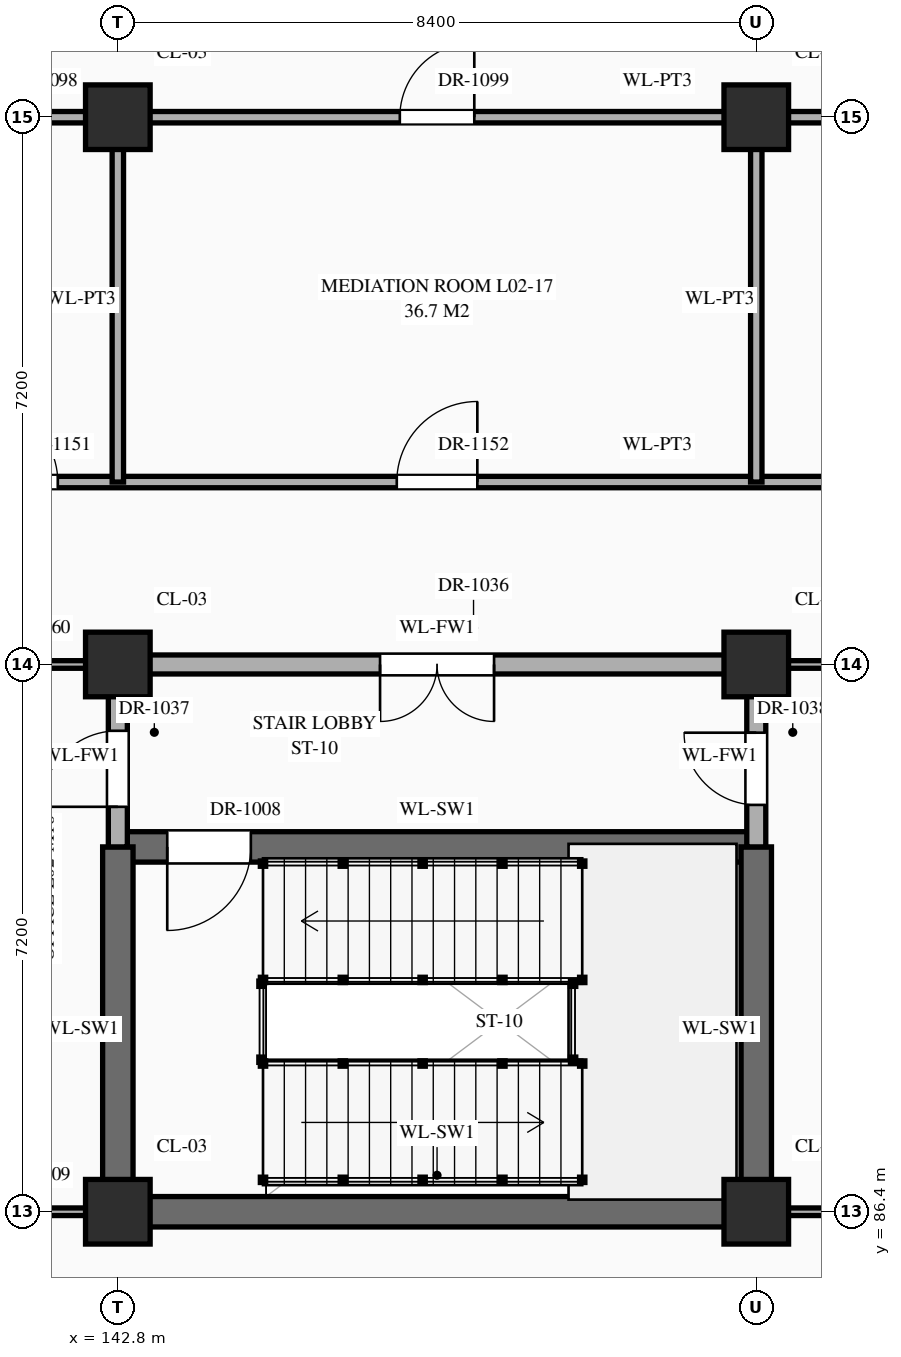
"""IFC4 building model, lengths in metres.
Left out: names, types, materials, properties, quantities, classifications, styles, units other than length and angle.
Written with IfcOpenShell. Run it as: python <this file> out.ifc"""

import sys

from ifc_helpers import new_model, si_unit, direction, frame, frame_2d, origin, origin_2d, place, context, subcontext, project, spatial, rectangle, extrude, element, fill, save


model = new_model("IFC4")
c1 = context("Model", 3, precision=1e-05, world=origin(), true_north=direction((0.0, 1.0)))
c2 = subcontext(c1, "Body", "Model", "MODEL_VIEW")
j1 = project(units=[si_unit("LENGTHUNIT", "METRE"), si_unit("PLANEANGLEUNIT", "RADIAN")], contexts=[c1])
p1 = place(None, origin())
s1 = spatial("IfcSite", under=j1, at=p1, CompositionType="ELEMENT")
p2 = place(p1, origin())
s2 = spatial("IfcBuilding", under=s1, at=p2, CompositionType="ELEMENT")
p3 = place(p2, frame((0.0, 0.0, 5.4)))
s3 = spatial("IfcBuildingStorey", under=s2, at=p3, CompositionType="ELEMENT", Elevation=5.4)
for number, where, z_axis, x_axis in (
    (1, (142.8, 86.4, 0.0), (0.0, 0.0, 1.0), (1.0, 0.0, 0.0)),
    (2, (142.8, 93.6, 0.0), (0.0, 0.0, 1.0), (1.0, 0.0, 0.0)),
    (3, (142.8, 100.8, 0.0), (0.0, 0.0, 1.0), (1.0, 0.0, 0.0)),
    (4, (151.2, 86.4, 0.0), (0.0, 0.0, 1.0), (1.0, 0.0, 0.0)),
    (5, (151.2, 93.6, 0.0), (0.0, 0.0, 1.0), (1.0, 0.0, 0.0)),
    (6, (151.2, 100.8, 0.0), (0.0, 0.0, 1.0), (1.0, 0.0, 0.0)),
):
    element("IfcColumn", number, at=place(p3, frame(where, z_axis=z_axis, x_axis=x_axis)), inside=s3, PredefinedType="COLUMN", context=c2, shape_type="SweptSolid", body=[
        extrude(rectangle(XDim=0.85, YDim=0.85, at=origin_2d()), origin(), (0.0, 0.0, 1.0), 5.4),
    ])
p4 = place(p3, frame((126.0, 86.4, 0.0), z_axis=(0.0, 0.0, 1.0), x_axis=(1.0, 0.0, 0.0)))
e7 = element("IfcWall", 7, at=p4, inside=s3, PredefinedType="STANDARD", context=c2, shape_type="SweptSolid", body=[
    extrude(rectangle(XDim=16.8, YDim=0.1, at=frame_2d((8.4, 0.0))), origin(), (0.0, 0.0, 1.0), 4.27),
])
p5 = place(p4, frame((3.63, 0.0, 0.0)))
e8 = element("IfcOpeningElement", 8, at=p5, cuts=e7, PredefinedType="OPENING", context=c2, shape_type="SweptSolid", body=[
    extrude(rectangle(XDim=1.14, YDim=2.4, at=frame_2d((0.57, 1.2))), frame((0.0, 0.062, 0.0), z_axis=(0.0, -1.0, 0.0), x_axis=(1.0, 0.0, 0.0)), (0.0, 0.0, 1.0), 0.124),
])
p6 = place(p4, frame((9.542, 0.0, 0.0)))
e9 = element("IfcOpeningElement", 9, at=p6, cuts=e7, PredefinedType="OPENING", context=c2, shape_type="SweptSolid", body=[
    extrude(rectangle(XDim=0.86, YDim=2.1, at=frame_2d((0.43, 1.05))), frame((0.0, 0.062, 0.0), z_axis=(0.0, -1.0, 0.0), x_axis=(1.0, 0.0, 0.0)), (0.0, 0.0, 1.0), 0.124),
])
p7 = place(p4, frame((11.875, 0.0, 0.0)))
e10 = element("IfcOpeningElement", 10, at=p7, cuts=e7, PredefinedType="OPENING", context=c2, shape_type="SweptSolid", body=[
    extrude(rectangle(XDim=1.45, YDim=2.3, at=frame_2d((0.725, 1.15))), frame((0.0, 0.062, 0.0), z_axis=(0.0, -1.0, 0.0), x_axis=(1.0, 0.0, 0.0)), (0.0, 0.0, 1.0), 0.124),
])
p8 = place(p4, frame((14.728, 0.0, 0.0)))
e11 = element("IfcOpeningElement", 11, at=p8, cuts=e7, PredefinedType="OPENING", context=c2, shape_type="SweptSolid", body=[
    extrude(rectangle(XDim=1.0, YDim=2.25, at=frame_2d((0.5, 1.125))), frame((0.0, 0.062, 0.0), z_axis=(0.0, -1.0, 0.0), x_axis=(1.0, 0.0, 0.0)), (0.0, 0.0, 1.0), 0.124),
])
p9 = place(p3, frame((142.8, 86.4, 0.0), z_axis=(0.0, 0.0, 1.0), x_axis=(1.0, 0.0, 0.0)))
e12 = element("IfcWall", 12, at=p9, inside=s3, PredefinedType="SHEAR", context=c2, shape_type="SweptSolid", body=[
    extrude(rectangle(XDim=8.4, YDim=0.4, at=frame_2d((4.2, 0.0))), origin(), (0.0, 0.0, 1.0), 5.12),
])
p10 = place(p3, frame((151.2, 86.4, 0.0), z_axis=(0.0, 0.0, 1.0), x_axis=(1.0, 0.0, 0.0)))
e13 = element("IfcWall", 13, at=p10, inside=s3, PredefinedType="STANDARD", context=c2, shape_type="SweptSolid", body=[
    extrude(rectangle(XDim=16.76, YDim=0.1, at=frame_2d((8.38, 0.0))), origin(), (0.0, 0.0, 1.0), 4.27),
])
p11 = place(p10, frame((3.68, 0.0, 0.0)))
e14 = element("IfcOpeningElement", 14, at=p11, cuts=e13, PredefinedType="OPENING", context=c2, shape_type="SweptSolid", body=[
    extrude(rectangle(XDim=1.04, YDim=2.2, at=frame_2d((0.52, 1.1))), frame((0.0, 0.062, 0.0), z_axis=(0.0, -1.0, 0.0), x_axis=(1.0, 0.0, 0.0)), (0.0, 0.0, 1.0), 0.124),
])
p12 = place(p10, frame((9.413, 0.0, 0.0)))
e15 = element("IfcOpeningElement", 15, at=p12, cuts=e13, PredefinedType="OPENING", context=c2, shape_type="SweptSolid", body=[
    extrude(rectangle(XDim=1.12, YDim=2.25, at=frame_2d((0.56, 1.125))), frame((0.0, 0.062, 0.0), z_axis=(0.0, -1.0, 0.0), x_axis=(1.0, 0.0, 0.0)), (0.0, 0.0, 1.0), 0.124),
])
p13 = place(p10, frame((12.0, 0.0, 0.0)))
e16 = element("IfcOpeningElement", 16, at=p13, cuts=e13, PredefinedType="OPENING", context=c2, shape_type="SweptSolid", body=[
    extrude(rectangle(XDim=1.2, YDim=2.35, at=frame_2d((0.6, 1.175))), frame((0.0, 0.062, 0.0), z_axis=(0.0, -1.0, 0.0), x_axis=(1.0, 0.0, 0.0)), (0.0, 0.0, 1.0), 0.124),
])
p14 = place(p10, frame((14.607, 0.0, 0.0)))
e17 = element("IfcOpeningElement", 17, at=p14, cuts=e13, PredefinedType="OPENING", context=c2, shape_type="SweptSolid", body=[
    extrude(rectangle(XDim=1.24, YDim=2.3, at=frame_2d((0.62, 1.15))), frame((0.0, 0.062, 0.0), z_axis=(0.0, -1.0, 0.0), x_axis=(1.0, 0.0, 0.0)), (0.0, 0.0, 1.0), 0.124),
])
p15 = place(p3, frame((142.8, 91.2, 0.0), z_axis=(0.0, 0.0, 1.0), x_axis=(1.0, 0.0, 0.0)))
e18 = element("IfcWall", 18, at=p15, inside=s3, PredefinedType="SHEAR", context=c2, shape_type="SweptSolid", body=[
    extrude(rectangle(XDim=8.4, YDim=0.4, at=frame_2d((4.2, 0.0))), origin(), (0.0, 0.0, 1.0), 5.12),
])
p16 = place(p15, frame((0.65, 0.0, 0.0)))
e19 = element("IfcOpeningElement", 19, at=p16, cuts=e18, PredefinedType="OPENING", context=c2, shape_type="SweptSolid", body=[
    extrude(rectangle(XDim=1.1, YDim=2.2, at=frame_2d((0.55, 1.1))), frame((0.0, 0.212, 0.0), z_axis=(0.0, -1.0, 0.0), x_axis=(1.0, 0.0, 0.0)), (0.0, 0.0, 1.0), 0.424),
])
p17 = place(p3, frame((126.0, 93.6, 0.0), z_axis=(0.0, 0.0, 1.0), x_axis=(1.0, 0.0, 0.0)))
e20 = element("IfcWall", 20, at=p17, inside=s3, PredefinedType="STANDARD", context=c2, shape_type="SweptSolid", body=[
    extrude(rectangle(XDim=16.8, YDim=0.1, at=frame_2d((8.4, 0.0))), origin(), (0.0, 0.0, 1.0), 4.27),
])
p18 = place(p17, frame((3.72, 0.0, 0.0)))
e21 = element("IfcOpeningElement", 21, at=p18, cuts=e20, PredefinedType="OPENING", context=c2, shape_type="SweptSolid", body=[
    extrude(rectangle(XDim=0.96, YDim=2.2, at=frame_2d((0.48, 1.1))), frame((0.0, 0.062, 0.0), z_axis=(0.0, -1.0, 0.0), x_axis=(1.0, 0.0, 0.0)), (0.0, 0.0, 1.0), 0.124),
])
p19 = place(p17, frame((9.472, 0.0, 0.0)))
e22 = element("IfcOpeningElement", 22, at=p19, cuts=e20, PredefinedType="OPENING", context=c2, shape_type="SweptSolid", body=[
    extrude(rectangle(XDim=1.0, YDim=2.25, at=frame_2d((0.5, 1.125))), frame((0.0, 0.062, 0.0), z_axis=(0.0, -1.0, 0.0), x_axis=(1.0, 0.0, 0.0)), (0.0, 0.0, 1.0), 0.124),
])
p20 = place(p17, frame((11.75, 0.0, 0.0)))
e23 = element("IfcOpeningElement", 23, at=p20, cuts=e20, PredefinedType="OPENING", context=c2, shape_type="SweptSolid", body=[
    extrude(rectangle(XDim=1.7, YDim=2.45, at=frame_2d((0.85, 1.225))), frame((0.0, 0.062, 0.0), z_axis=(0.0, -1.0, 0.0), x_axis=(1.0, 0.0, 0.0)), (0.0, 0.0, 1.0), 0.124),
])
p21 = place(p17, frame((14.688, 0.0, 0.0)))
e24 = element("IfcOpeningElement", 24, at=p21, cuts=e20, PredefinedType="OPENING", context=c2, shape_type="SweptSolid", body=[
    extrude(rectangle(XDim=1.08, YDim=2.25, at=frame_2d((0.54, 1.125))), frame((0.0, 0.062, 0.0), z_axis=(0.0, -1.0, 0.0), x_axis=(1.0, 0.0, 0.0)), (0.0, 0.0, 1.0), 0.124),
])
p22 = place(p3, frame((142.8, 93.6, 0.0), z_axis=(0.0, 0.0, 1.0), x_axis=(1.0, 0.0, 0.0)))
e25 = element("IfcWall", 25, at=p22, inside=s3, PredefinedType="STANDARD", context=c2, shape_type="SweptSolid", body=[
    extrude(rectangle(XDim=8.4, YDim=0.25, at=frame_2d((4.2, 0.0))), origin(), (0.0, 0.0, 1.0), 4.27),
])
p23 = place(p22, frame((3.45, 0.0, 0.0)))
e26 = element("IfcOpeningElement", 26, at=p23, cuts=e25, PredefinedType="OPENING", context=c2, shape_type="SweptSolid", body=[
    extrude(rectangle(XDim=1.5, YDim=2.25, at=frame_2d((0.75, 1.125))), frame((0.0, 0.137, 0.0), z_axis=(0.0, -1.0, 0.0), x_axis=(1.0, 0.0, 0.0)), (0.0, 0.0, 1.0), 0.274),
])
p24 = place(p3, frame((151.2, 93.6, 0.0), z_axis=(0.0, 0.0, 1.0), x_axis=(1.0, 0.0, 0.0)))
e27 = element("IfcWall", 27, at=p24, inside=s3, PredefinedType="STANDARD", context=c2, shape_type="SweptSolid", body=[
    extrude(rectangle(XDim=16.76, YDim=0.1, at=frame_2d((8.38, 0.0))), origin(), (0.0, 0.0, 1.0), 4.27),
])
p25 = place(p24, frame((3.64, 0.0, 0.0)))
e28 = element("IfcOpeningElement", 28, at=p25, cuts=e27, PredefinedType="OPENING", context=c2, shape_type="SweptSolid", body=[
    extrude(rectangle(XDim=1.12, YDim=2.25, at=frame_2d((0.56, 1.125))), frame((0.0, 0.062, 0.0), z_axis=(0.0, -1.0, 0.0), x_axis=(1.0, 0.0, 0.0)), (0.0, 0.0, 1.0), 0.124),
])
p26 = place(p24, frame((9.393, 0.0, 0.0)))
e29 = element("IfcOpeningElement", 29, at=p26, cuts=e27, PredefinedType="OPENING", context=c2, shape_type="SweptSolid", body=[
    extrude(rectangle(XDim=1.16, YDim=2.3, at=frame_2d((0.58, 1.15))), frame((0.0, 0.062, 0.0), z_axis=(0.0, -1.0, 0.0), x_axis=(1.0, 0.0, 0.0)), (0.0, 0.0, 1.0), 0.124),
])
p27 = place(p24, frame((12.0, 0.0, 0.0)))
e30 = element("IfcOpeningElement", 30, at=p27, cuts=e27, PredefinedType="OPENING", context=c2, shape_type="SweptSolid", body=[
    extrude(rectangle(XDim=1.2, YDim=2.35, at=frame_2d((0.6, 1.175))), frame((0.0, 0.062, 0.0), z_axis=(0.0, -1.0, 0.0), x_axis=(1.0, 0.0, 0.0)), (0.0, 0.0, 1.0), 0.124),
])
p28 = place(p24, frame((14.607, 0.0, 0.0)))
e31 = element("IfcOpeningElement", 31, at=p28, cuts=e27, PredefinedType="OPENING", context=c2, shape_type="SweptSolid", body=[
    extrude(rectangle(XDim=1.24, YDim=2.3, at=frame_2d((0.62, 1.15))), frame((0.0, 0.062, 0.0), z_axis=(0.0, -1.0, 0.0), x_axis=(1.0, 0.0, 0.0)), (0.0, 0.0, 1.0), 0.124),
])
p29 = place(p3, frame((140.2, 96.0, 0.0), z_axis=(0.0, 0.0, 1.0), x_axis=(1.0, 0.0, 0.0)))
e32 = element("IfcWall", 32, at=p29, inside=s3, PredefinedType="STANDARD", context=c2, shape_type="SweptSolid", body=[
    extrude(rectangle(XDim=19.4, YDim=0.15, at=frame_2d((9.7, 0.0))), origin(), (0.0, 0.0, 1.0), 5.12),
])
p30 = place(p29, frame((0.79, 0.0, 0.0)))
e33 = element("IfcOpeningElement", 33, at=p30, cuts=e32, PredefinedType="OPENING", context=c2, shape_type="SweptSolid", body=[
    extrude(rectangle(XDim=1.02, YDim=2.4, at=frame_2d((0.51, 1.2))), frame((0.0, 0.087, 0.0), z_axis=(0.0, -1.0, 0.0), x_axis=(1.0, 0.0, 0.0)), (0.0, 0.0, 1.0), 0.174),
])
p31 = place(p29, frame((6.27, 0.0, 0.0)))
e34 = element("IfcOpeningElement", 34, at=p31, cuts=e32, PredefinedType="OPENING", context=c2, shape_type="SweptSolid", body=[
    extrude(rectangle(XDim=1.06, YDim=2.4, at=frame_2d((0.53, 1.2))), frame((0.0, 0.087, 0.0), z_axis=(0.0, -1.0, 0.0), x_axis=(1.0, 0.0, 0.0)), (0.0, 0.0, 1.0), 0.174),
])
p32 = place(p29, frame((14.63, 0.0, 0.0)))
e35 = element("IfcOpeningElement", 35, at=p32, cuts=e32, PredefinedType="OPENING", context=c2, shape_type="SweptSolid", body=[
    extrude(rectangle(XDim=1.14, YDim=2.4, at=frame_2d((0.57, 1.2))), frame((0.0, 0.087, 0.0), z_axis=(0.0, -1.0, 0.0), x_axis=(1.0, 0.0, 0.0)), (0.0, 0.0, 1.0), 0.174),
])
p33 = place(p3, frame((140.2, 100.8, 0.0), z_axis=(0.0, 0.0, 1.0), x_axis=(1.0, 0.0, 0.0)))
e36 = element("IfcWall", 36, at=p33, inside=s3, PredefinedType="STANDARD", context=c2, shape_type="SweptSolid", body=[
    extrude(rectangle(XDim=19.4, YDim=0.15, at=frame_2d((9.7, 0.0))), origin(), (0.0, 0.0, 1.0), 4.27),
])
p34 = place(p33, frame((0.657, 0.0, 0.0)))
e37 = element("IfcOpeningElement", 37, at=p34, cuts=e36, PredefinedType="OPENING", context=c2, shape_type="SweptSolid", body=[
    extrude(rectangle(XDim=0.94, YDim=2.3, at=frame_2d((0.47, 1.15))), frame((0.0, 0.087, 0.0), z_axis=(0.0, -1.0, 0.0), x_axis=(1.0, 0.0, 0.0)), (0.0, 0.0, 1.0), 0.174),
])
p35 = place(p33, frame((6.31, 0.0, 0.0)))
e38 = element("IfcOpeningElement", 38, at=p35, cuts=e36, PredefinedType="OPENING", context=c2, shape_type="SweptSolid", body=[
    extrude(rectangle(XDim=0.98, YDim=2.35, at=frame_2d((0.49, 1.175))), frame((0.0, 0.087, 0.0), z_axis=(0.0, -1.0, 0.0), x_axis=(1.0, 0.0, 0.0)), (0.0, 0.0, 1.0), 0.174),
])
p36 = place(p33, frame((14.69, 0.0, 0.0)))
e39 = element("IfcOpeningElement", 39, at=p36, cuts=e36, PredefinedType="OPENING", context=c2, shape_type="SweptSolid", body=[
    extrude(rectangle(XDim=1.02, YDim=2.4, at=frame_2d((0.51, 1.2))), frame((0.0, 0.087, 0.0), z_axis=(0.0, -1.0, 0.0), x_axis=(1.0, 0.0, 0.0)), (0.0, 0.0, 1.0), 0.174),
])
p37 = place(p3, frame((142.8, 86.4, 0.0), z_axis=(0.0, 0.0, 1.0), x_axis=(0.0, 1.0, 0.0)))
e40 = element("IfcWall", 40, at=p37, inside=s3, PredefinedType="SHEAR", context=c2, shape_type="SweptSolid", body=[
    extrude(rectangle(XDim=4.8, YDim=0.4, at=frame_2d((2.4, 0.0))), origin(), (0.0, 0.0, 1.0), 5.12),
])
p38 = place(p3, frame((142.8, 91.2, 0.0), z_axis=(0.0, 0.0, 1.0), x_axis=(0.0, 1.0, 0.0)))
e41 = element("IfcWall", 41, at=p38, inside=s3, PredefinedType="STANDARD", context=c2, shape_type="SweptSolid", body=[
    extrude(rectangle(XDim=2.4, YDim=0.25, at=frame_2d((1.2, 0.0))), origin(), (0.0, 0.0, 1.0), 4.37),
])
p39 = place(p38, frame((0.528, 0.0, 0.0)))
e42 = element("IfcOpeningElement", 42, at=p39, cuts=e41, PredefinedType="OPENING", context=c2, shape_type="SweptSolid", body=[
    extrude(rectangle(XDim=1.0, YDim=2.2, at=frame_2d((0.5, 1.1))), frame((0.0, 0.137, 0.0), z_axis=(0.0, -1.0, 0.0), x_axis=(1.0, 0.0, 0.0)), (0.0, 0.0, 1.0), 0.274),
])
p40 = place(p3, frame((142.8, 96.0, 0.0), z_axis=(0.0, 0.0, 1.0), x_axis=(0.0, 1.0, 0.0)))
e43 = element("IfcWall", 43, at=p40, inside=s3, PredefinedType="STANDARD", context=c2, shape_type="SweptSolid", body=[
    extrude(rectangle(XDim=4.8, YDim=0.15, at=frame_2d((2.4, 0.0))), origin(), (0.0, 0.0, 1.0), 4.37),
])
p41 = place(p3, frame((151.2, 86.4, 0.0), z_axis=(0.0, 0.0, 1.0), x_axis=(0.0, 1.0, 0.0)))
e44 = element("IfcWall", 44, at=p41, inside=s3, PredefinedType="SHEAR", context=c2, shape_type="SweptSolid", body=[
    extrude(rectangle(XDim=4.8, YDim=0.4, at=frame_2d((2.4, 0.0))), origin(), (0.0, 0.0, 1.0), 5.12),
])
p42 = place(p3, frame((151.2, 91.2, 0.0), z_axis=(0.0, 0.0, 1.0), x_axis=(0.0, 1.0, 0.0)))
e45 = element("IfcWall", 45, at=p42, inside=s3, PredefinedType="STANDARD", context=c2, shape_type="SweptSolid", body=[
    extrude(rectangle(XDim=2.4, YDim=0.25, at=frame_2d((1.2, 0.0))), origin(), (0.0, 0.0, 1.0), 4.37),
])
p43 = place(p42, frame((0.552, 0.0, 0.0)))
e46 = element("IfcOpeningElement", 46, at=p43, cuts=e45, PredefinedType="OPENING", context=c2, shape_type="SweptSolid", body=[
    extrude(rectangle(XDim=0.95, YDim=2.15, at=frame_2d((0.475, 1.075))), frame((0.0, 0.137, 0.0), z_axis=(0.0, -1.0, 0.0), x_axis=(1.0, 0.0, 0.0)), (0.0, 0.0, 1.0), 0.274),
])
p44 = place(p3, frame((151.2, 96.0, 0.0), z_axis=(0.0, 0.0, 1.0), x_axis=(0.0, 1.0, 0.0)))
e47 = element("IfcWall", 47, at=p44, inside=s3, PredefinedType="STANDARD", context=c2, shape_type="SweptSolid", body=[
    extrude(rectangle(XDim=4.8, YDim=0.15, at=frame_2d((2.4, 0.0))), origin(), (0.0, 0.0, 1.0), 4.37),
])
p45 = place(p16, frame((1.1, 0.0, 0.0), z_axis=(0.0, 0.0, 1.0), x_axis=(-1.0, 0.0, 0.0)))
e48 = element("IfcDoor", 48, at=p45, inside=s3, OperationType="SINGLE_SWING_RIGHT", PredefinedType="DOOR", context=c2, shape_type="SweptSolid", body=[
    extrude(rectangle(XDim=1.1, YDim=2.2, at=frame_2d((0.55, 1.1))), frame((0.0, 0.025, 0.0), z_axis=(0.0, -1.0, 0.0), x_axis=(1.0, 0.0, 0.0)), (0.0, 0.0, 1.0), 0.05),
])
fill(e19, e48)
p46 = place(p23, frame((1.5, 0.0, 0.0), z_axis=(0.0, 0.0, 1.0), x_axis=(-1.0, 0.0, 0.0)))
e49 = element("IfcDoor", 49, at=p46, inside=s3, OperationType="DOUBLE_DOOR_SINGLE_SWING", PredefinedType="DOOR", context=c2, shape_type="SweptSolid", body=[
    extrude(rectangle(XDim=1.5, YDim=2.25, at=frame_2d((0.75, 1.125))), frame((0.0, 0.025, 0.0), z_axis=(0.0, -1.0, 0.0), x_axis=(1.0, 0.0, 0.0)), (0.0, 0.0, 1.0), 0.05),
])
fill(e26, e49)
p47 = place(p39, origin())
e50 = element("IfcDoor", 50, at=p47, inside=s3, OperationType="SINGLE_SWING_LEFT", PredefinedType="DOOR", context=c2, shape_type="SweptSolid", body=[
    extrude(rectangle(XDim=1.0, YDim=2.2, at=frame_2d((0.5, 1.1))), frame((0.0, 0.025, 0.0), z_axis=(0.0, -1.0, 0.0), x_axis=(1.0, 0.0, 0.0)), (0.0, 0.0, 1.0), 0.05),
])
fill(e42, e50)
p48 = place(p43, origin())
e51 = element("IfcDoor", 51, at=p48, inside=s3, OperationType="SINGLE_SWING_RIGHT", PredefinedType="DOOR", context=c2, shape_type="SweptSolid", body=[
    extrude(rectangle(XDim=0.95, YDim=2.15, at=frame_2d((0.475, 1.075))), frame((0.0, 0.025, 0.0), z_axis=(0.0, -1.0, 0.0), x_axis=(1.0, 0.0, 0.0)), (0.0, 0.0, 1.0), 0.05),
])
fill(e46, e51)
p49 = place(p35, origin())
e52 = element("IfcDoor", 52, at=p49, inside=s3, OperationType="SINGLE_SWING_RIGHT", PredefinedType="DOOR", context=c2, shape_type="SweptSolid", body=[
    extrude(rectangle(XDim=0.98, YDim=2.35, at=frame_2d((0.49, 1.175))), frame((0.0, 0.025, 0.0), z_axis=(0.0, -1.0, 0.0), x_axis=(1.0, 0.0, 0.0)), (0.0, 0.0, 1.0), 0.05),
])
fill(e38, e52)
p50 = place(p30, origin())
e53 = element("IfcDoor", 53, at=p50, inside=s3, OperationType="SINGLE_SWING_LEFT", PredefinedType="DOOR", context=c2, shape_type="SweptSolid", body=[
    extrude(rectangle(XDim=1.02, YDim=2.4, at=frame_2d((0.51, 1.2))), frame((0.0, 0.025, 0.0), z_axis=(0.0, -1.0, 0.0), x_axis=(1.0, 0.0, 0.0)), (0.0, 0.0, 1.0), 0.05),
])
fill(e33, e53)
p51 = place(p31, origin())
e54 = element("IfcDoor", 54, at=p51, inside=s3, OperationType="SINGLE_SWING_RIGHT", PredefinedType="DOOR", context=c2, shape_type="SweptSolid", body=[
    extrude(rectangle(XDim=1.06, YDim=2.4, at=frame_2d((0.53, 1.2))), frame((0.0, 0.025, 0.0), z_axis=(0.0, -1.0, 0.0), x_axis=(1.0, 0.0, 0.0)), (0.0, 0.0, 1.0), 0.05),
])
fill(e34, e54)
save(model, sys.argv[1])
